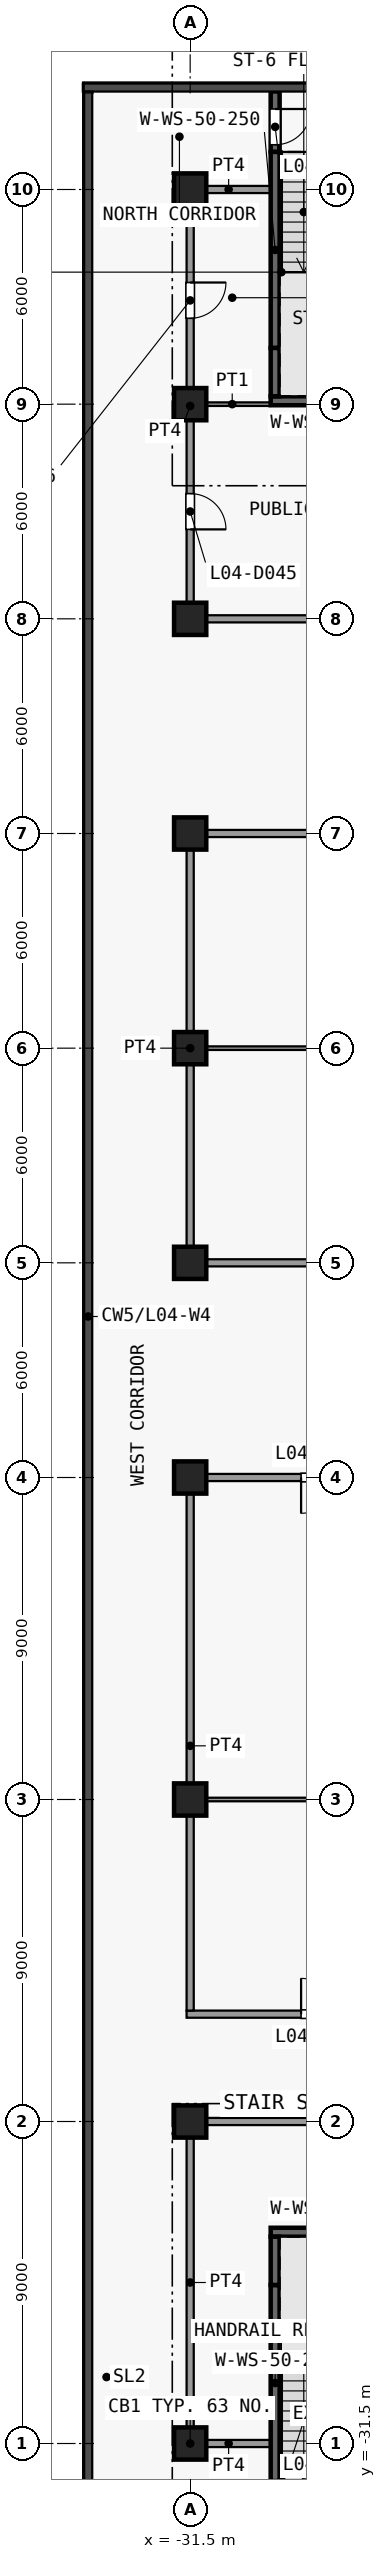
"""IFC4 building model, lengths in metres.
Left out: names, types, materials, properties, quantities, classifications, styles, units other than length and angle.
Written with IfcOpenShell. Run it as: python <this file> out.ifc"""

import sys

from ifc_helpers import new_model, si_unit, direction, frame, frame_2d, origin, origin_2d, place, context, subcontext, project, spatial, rectangle, extrude, element, fill, save


model = new_model("IFC4")
c1 = context("Model", 3, precision=1e-05, world=origin(), true_north=direction((0.0, 1.0)))
c2 = subcontext(c1, "Body", "Model", "MODEL_VIEW")
j1 = project(units=[si_unit("LENGTHUNIT", "METRE"), si_unit("PLANEANGLEUNIT", "RADIAN")], contexts=[c1])
p1 = place(None, origin())
s1 = spatial("IfcSite", under=j1, at=p1, CompositionType="ELEMENT")
p2 = place(p1, origin())
s2 = spatial("IfcBuilding", under=s1, at=p2, CompositionType="ELEMENT")
p3 = place(p2, frame((0.0, 0.0, 23.5)))
s3 = spatial("IfcBuildingStorey", under=s2, at=p3, CompositionType="ELEMENT", Elevation=23.5)
for number, where, z_axis, x_axis in (
    (1, (-31.5, -31.5, 0.0), (0.0, 0.0, 1.0), (1.0, 0.0, 0.0)),
    (2, (-31.5, -22.5, 0.0), (0.0, 0.0, 1.0), (1.0, 0.0, 0.0)),
    (3, (-31.5, -13.5, 0.0), (0.0, 0.0, 1.0), (1.0, 0.0, 0.0)),
    (4, (-31.5, -4.5, 0.0), (0.0, 0.0, 1.0), (1.0, 0.0, 0.0)),
    (5, (-31.5, 1.5, 0.0), (0.0, 0.0, 1.0), (1.0, 0.0, 0.0)),
    (6, (-31.5, 7.5, 0.0), (0.0, 0.0, 1.0), (1.0, 0.0, 0.0)),
    (7, (-31.5, 13.5, 0.0), (0.0, 0.0, 1.0), (1.0, 0.0, 0.0)),
    (8, (-31.5, 19.5, 0.0), (0.0, 0.0, 1.0), (1.0, 0.0, 0.0)),
    (9, (-31.5, 25.5, 0.0), (0.0, 0.0, 1.0), (1.0, 0.0, 0.0)),
    (10, (-31.5, 31.5, 0.0), (0.0, 0.0, 1.0), (1.0, 0.0, 0.0)),
):
    element("IfcColumn", number, at=place(p3, frame(where, z_axis=z_axis, x_axis=x_axis)), inside=s3, PredefinedType="COLUMN", context=c2, shape_type="SweptSolid", body=[
        extrude(rectangle(XDim=0.9, YDim=0.9, at=origin_2d()), origin(), (0.0, 0.0, 1.0), 4.5),
    ])
p4 = place(p3, frame((-29.125, -32.55, 0.0), z_axis=(0.0, 0.0, 1.0), x_axis=(0.0, 1.0, 0.0)))
e11 = element("IfcWall", 11, at=p4, inside=s3, PredefinedType="SHEAR", context=c2, shape_type="SweptSolid", body=[
    extrude(rectangle(XDim=5.48, YDim=0.25, at=frame_2d((2.74, 0.0))), origin(), (0.0, 0.0, 1.0), 4.15),
])
p5 = place(p3, frame((-29.125, -27.07, 0.0), z_axis=(0.0, 0.0, 1.0), x_axis=(0.0, 1.0, 0.0)))
e12 = element("IfcWall", 12, at=p5, inside=s3, PredefinedType="SHEAR", context=c2, shape_type="SweptSolid", body=[
    extrude(rectangle(XDim=1.35, YDim=0.25, at=frame_2d((0.675, 0.0))), origin(), (0.0, 0.0, 1.0), 4.15),
])
p6 = place(p3, frame((-29.25, -25.595, 0.0), z_axis=(0.0, 0.0, 1.0), x_axis=(1.0, 0.0, 0.0)))
e13 = element("IfcWall", 13, at=p6, inside=s3, PredefinedType="SHEAR", context=c2, shape_type="SweptSolid", body=[
    extrude(rectangle(XDim=3.35, YDim=0.25, at=frame_2d((1.675, 0.0))), origin(), (0.0, 0.0, 1.0), 4.15),
])
p7 = place(p3, frame((-29.125, 34.24, 0.0), z_axis=(0.0, 0.0, 1.0), x_axis=(0.0, -1.0, 0.0)))
e14 = element("IfcWall", 14, at=p7, inside=s3, PredefinedType="SHEAR", context=c2, shape_type="SweptSolid", body=[
    extrude(rectangle(XDim=1.69, YDim=0.25, at=frame_2d((0.845, 0.0))), origin(), (0.0, 0.0, 1.0), 4.15),
])
p8 = place(p7, frame((0.49, 0.0, 0.0)))
e15 = element("IfcOpeningElement", 15, at=p8, cuts=e14, PredefinedType="OPENING", context=c2, shape_type="SweptSolid", body=[
    extrude(rectangle(XDim=1.0, YDim=2.1, at=frame_2d((0.5, 1.05))), frame((0.0, 0.135, 0.0), z_axis=(0.0, -1.0, 0.0), x_axis=(1.0, 0.0, 0.0)), (0.0, 0.0, 1.0), 0.27),
])
p9 = place(p3, frame((-29.125, 27.07, 0.0), z_axis=(0.0, 0.0, 1.0), x_axis=(0.0, 1.0, 0.0)))
e16 = element("IfcWall", 16, at=p9, inside=s3, PredefinedType="SHEAR", context=c2, shape_type="SweptSolid", body=[
    extrude(rectangle(XDim=5.48, YDim=0.25, at=frame_2d((2.74, 0.0))), origin(), (0.0, 0.0, 1.0), 4.15),
])
p10 = place(p3, frame((-29.125, 25.72, 0.0), z_axis=(0.0, 0.0, 1.0), x_axis=(0.0, 1.0, 0.0)))
e17 = element("IfcWall", 17, at=p10, inside=s3, PredefinedType="SHEAR", context=c2, shape_type="SweptSolid", body=[
    extrude(rectangle(XDim=1.35, YDim=0.25, at=frame_2d((0.675, 0.0))), origin(), (0.0, 0.0, 1.0), 4.15),
])
p11 = place(p3, frame((-29.25, 25.595, 0.0), z_axis=(0.0, 0.0, 1.0), x_axis=(1.0, 0.0, 0.0)))
e18 = element("IfcWall", 18, at=p11, inside=s3, PredefinedType="SHEAR", context=c2, shape_type="SweptSolid", body=[
    extrude(rectangle(XDim=3.35, YDim=0.25, at=frame_2d((1.675, 0.0))), origin(), (0.0, 0.0, 1.0), 4.15),
])
p12 = place(p3, frame((-31.6, -31.5, 0.0), z_axis=(0.0, 0.0, 1.0), x_axis=(1.0, 0.0, 0.0)))
e19 = element("IfcWall", 19, at=p12, inside=s3, PredefinedType="PARTITIONING", context=c2, shape_type="SweptSolid", body=[
    extrude(rectangle(XDim=2.35, YDim=0.2, at=frame_2d((1.175, 0.0))), origin(), (0.0, 0.0, 1.0), 4.15),
])
p13 = place(p3, frame((-31.6, -22.5, 0.0), z_axis=(0.0, 0.0, 1.0), x_axis=(1.0, 0.0, 0.0)))
e20 = element("IfcWall", 20, at=p13, inside=s3, PredefinedType="PARTITIONING", context=c2, shape_type="SweptSolid", body=[
    extrude(rectangle(XDim=14.2, YDim=0.2, at=frame_2d((7.1, 0.0))), origin(), (0.0, 0.0, 1.0), 4.15),
])
p14 = place(p3, frame((-31.6, -19.5, 0.0), z_axis=(0.0, 0.0, 1.0), x_axis=(1.0, 0.0, 0.0)))
e21 = element("IfcWall", 21, at=p14, inside=s3, PredefinedType="PARTITIONING", context=c2, shape_type="SweptSolid", body=[
    extrude(rectangle(XDim=18.1, YDim=0.2, at=frame_2d((9.05, 0.0))), origin(), (0.0, 0.0, 1.0), 4.15),
])
p15 = place(p14, frame((3.2, 0.0, 0.0)))
e22 = element("IfcOpeningElement", 22, at=p15, cuts=e21, PredefinedType="OPENING", context=c2, shape_type="SweptSolid", body=[
    extrude(rectangle(XDim=1.0, YDim=2.1, at=frame_2d((0.5, 1.05))), frame((0.0, 0.11, 0.0), z_axis=(0.0, -1.0, 0.0), x_axis=(1.0, 0.0, 0.0)), (0.0, 0.0, 1.0), 0.22),
])
p16 = place(p14, frame((14.0, 0.0, 0.0)))
e23 = element("IfcOpeningElement", 23, at=p16, cuts=e21, PredefinedType="OPENING", context=c2, shape_type="SweptSolid", body=[
    extrude(rectangle(XDim=1.0, YDim=2.1, at=frame_2d((0.5, 1.05))), frame((0.0, 0.11, 0.0), z_axis=(0.0, -1.0, 0.0), x_axis=(1.0, 0.0, 0.0)), (0.0, 0.0, 1.0), 0.22),
])
p17 = place(p3, frame((-31.4, -13.5, 0.0), z_axis=(0.0, 0.0, 1.0), x_axis=(1.0, 0.0, 0.0)))
e24 = element("IfcWall", 24, at=p17, inside=s3, PredefinedType="PARTITIONING", context=c2, shape_type="SweptSolid", body=[
    extrude(rectangle(XDim=17.9, YDim=0.1, at=frame_2d((8.95, 0.0))), origin(), (0.0, 0.0, 1.0), 4.15),
])
p18 = place(p3, frame((-31.6, -4.5, 0.0), z_axis=(0.0, 0.0, 1.0), x_axis=(1.0, 0.0, 0.0)))
e25 = element("IfcWall", 25, at=p18, inside=s3, PredefinedType="PARTITIONING", context=c2, shape_type="SweptSolid", body=[
    extrude(rectangle(XDim=18.2, YDim=0.2, at=frame_2d((9.1, 0.0))), origin(), (0.0, 0.0, 1.0), 4.15),
])
p19 = place(p18, frame((3.2, 0.0, 0.0)))
e26 = element("IfcOpeningElement", 26, at=p19, cuts=e25, PredefinedType="OPENING", context=c2, shape_type="SweptSolid", body=[
    extrude(rectangle(XDim=1.0, YDim=2.1, at=frame_2d((0.5, 1.05))), frame((0.0, 0.11, 0.0), z_axis=(0.0, -1.0, 0.0), x_axis=(1.0, 0.0, 0.0)), (0.0, 0.0, 1.0), 0.22),
])
p20 = place(p18, frame((13.2, 0.0, 0.0)))
e27 = element("IfcOpeningElement", 27, at=p20, cuts=e25, PredefinedType="OPENING", context=c2, shape_type="SweptSolid", body=[
    extrude(rectangle(XDim=1.0, YDim=2.1, at=frame_2d((0.5, 1.05))), frame((0.0, 0.11, 0.0), z_axis=(0.0, -1.0, 0.0), x_axis=(1.0, 0.0, 0.0)), (0.0, 0.0, 1.0), 0.22),
])
p21 = place(p3, frame((-31.6, 1.5, 0.0), z_axis=(0.0, 0.0, 1.0), x_axis=(1.0, 0.0, 0.0)))
e28 = element("IfcWall", 28, at=p21, inside=s3, PredefinedType="PARTITIONING", context=c2, shape_type="SweptSolid", body=[
    extrude(rectangle(XDim=11.3, YDim=0.2, at=frame_2d((5.65, 0.0))), origin(), (0.0, 0.0, 1.0), 4.15),
])
p22 = place(p21, frame((5.1, 0.0, 0.0)))
e29 = element("IfcOpeningElement", 29, at=p22, cuts=e28, PredefinedType="OPENING", context=c2, shape_type="SweptSolid", body=[
    extrude(rectangle(XDim=1.0, YDim=2.1, at=frame_2d((0.5, 1.05))), frame((0.0, 0.11, 0.0), z_axis=(0.0, -1.0, 0.0), x_axis=(1.0, 0.0, 0.0)), (0.0, 0.0, 1.0), 0.22),
])
p23 = place(p3, frame((-31.4, 7.5, 0.0), z_axis=(0.0, 0.0, 1.0), x_axis=(1.0, 0.0, 0.0)))
e30 = element("IfcWall", 30, at=p23, inside=s3, PredefinedType="PARTITIONING", context=c2, shape_type="SweptSolid", body=[
    extrude(rectangle(XDim=10.9, YDim=0.1, at=frame_2d((5.45, 0.0))), origin(), (0.0, 0.0, 1.0), 4.15),
])
p24 = place(p3, frame((-31.6, 13.5, 0.0), z_axis=(0.0, 0.0, 1.0), x_axis=(1.0, 0.0, 0.0)))
e31 = element("IfcWall", 31, at=p24, inside=s3, PredefinedType="PARTITIONING", context=c2, shape_type="SweptSolid", body=[
    extrude(rectangle(XDim=11.3, YDim=0.2, at=frame_2d((5.65, 0.0))), origin(), (0.0, 0.0, 1.0), 4.15),
])
p25 = place(p24, frame((5.1, 0.0, 0.0)))
e32 = element("IfcOpeningElement", 32, at=p25, cuts=e31, PredefinedType="OPENING", context=c2, shape_type="SweptSolid", body=[
    extrude(rectangle(XDim=1.0, YDim=2.1, at=frame_2d((0.5, 1.05))), frame((0.0, 0.11, 0.0), z_axis=(0.0, -1.0, 0.0), x_axis=(1.0, 0.0, 0.0)), (0.0, 0.0, 1.0), 0.22),
])
p26 = place(p3, frame((-31.6, 19.5, 0.0), z_axis=(0.0, 0.0, 1.0), x_axis=(1.0, 0.0, 0.0)))
e33 = element("IfcWall", 33, at=p26, inside=s3, PredefinedType="PARTITIONING", context=c2, shape_type="SweptSolid", body=[
    extrude(rectangle(XDim=60.1, YDim=0.2, at=frame_2d((30.05, 0.0))), origin(), (0.0, 0.0, 1.0), 4.15),
])
p27 = place(p26, frame((7.2, 0.0, 0.0)))
e34 = element("IfcOpeningElement", 34, at=p27, cuts=e33, PredefinedType="OPENING", context=c2, shape_type="SweptSolid", body=[
    extrude(rectangle(XDim=1.0, YDim=2.1, at=frame_2d((0.5, 1.05))), frame((0.0, 0.11, 0.0), z_axis=(0.0, -1.0, 0.0), x_axis=(1.0, 0.0, 0.0)), (0.0, 0.0, 1.0), 0.22),
])
p28 = place(p26, frame((13.2, 0.0, 0.0)))
e35 = element("IfcOpeningElement", 35, at=p28, cuts=e33, PredefinedType="OPENING", context=c2, shape_type="SweptSolid", body=[
    extrude(rectangle(XDim=1.0, YDim=2.1, at=frame_2d((0.5, 1.05))), frame((0.0, 0.11, 0.0), z_axis=(0.0, -1.0, 0.0), x_axis=(1.0, 0.0, 0.0)), (0.0, 0.0, 1.0), 0.22),
])
p29 = place(p26, frame((25.2, 0.0, 0.0)))
e36 = element("IfcOpeningElement", 36, at=p29, cuts=e33, PredefinedType="OPENING", context=c2, shape_type="SweptSolid", body=[
    extrude(rectangle(XDim=1.0, YDim=2.1, at=frame_2d((0.5, 1.05))), frame((0.0, 0.11, 0.0), z_axis=(0.0, -1.0, 0.0), x_axis=(1.0, 0.0, 0.0)), (0.0, 0.0, 1.0), 0.22),
])
p30 = place(p26, frame((33.5, 0.0, 0.0)))
e37 = element("IfcOpeningElement", 37, at=p30, cuts=e33, PredefinedType="OPENING", context=c2, shape_type="SweptSolid", body=[
    extrude(rectangle(XDim=1.8, YDim=2.1, at=frame_2d((0.9, 1.05))), frame((0.0, 0.11, 0.0), z_axis=(0.0, -1.0, 0.0), x_axis=(1.0, 0.0, 0.0)), (0.0, 0.0, 1.0), 0.22),
])
p31 = place(p26, frame((49.0, 0.0, 0.0)))
e38 = element("IfcOpeningElement", 38, at=p31, cuts=e33, PredefinedType="OPENING", context=c2, shape_type="SweptSolid", body=[
    extrude(rectangle(XDim=1.8, YDim=2.1, at=frame_2d((0.9, 1.05))), frame((0.0, 0.11, 0.0), z_axis=(0.0, -1.0, 0.0), x_axis=(1.0, 0.0, 0.0)), (0.0, 0.0, 1.0), 0.22),
])
p32 = place(p26, frame((55.0, 0.0, 0.0)))
e39 = element("IfcOpeningElement", 39, at=p32, cuts=e33, PredefinedType="OPENING", context=c2, shape_type="SweptSolid", body=[
    extrude(rectangle(XDim=1.0, YDim=2.1, at=frame_2d((0.5, 1.05))), frame((0.0, 0.11, 0.0), z_axis=(0.0, -1.0, 0.0), x_axis=(1.0, 0.0, 0.0)), (0.0, 0.0, 1.0), 0.22),
])
p33 = place(p26, frame((58.3, 0.0, 0.0)))
e40 = element("IfcOpeningElement", 40, at=p33, cuts=e33, PredefinedType="OPENING", context=c2, shape_type="SweptSolid", body=[
    extrude(rectangle(XDim=1.0, YDim=2.1, at=frame_2d((0.5, 1.05))), frame((0.0, 0.11, 0.0), z_axis=(0.0, -1.0, 0.0), x_axis=(1.0, 0.0, 0.0)), (0.0, 0.0, 1.0), 0.22),
])
p34 = place(p3, frame((-31.4, 25.5, 0.0), z_axis=(0.0, 0.0, 1.0), x_axis=(1.0, 0.0, 0.0)))
e41 = element("IfcWall", 41, at=p34, inside=s3, PredefinedType="PARTITIONING", context=c2, shape_type="SweptSolid", body=[
    extrude(rectangle(XDim=2.15, YDim=0.1, at=frame_2d((1.075, 0.0))), origin(), (0.0, 0.0, 1.0), 4.15),
])
p35 = place(p3, frame((-31.6, 31.5, 0.0), z_axis=(0.0, 0.0, 1.0), x_axis=(1.0, 0.0, 0.0)))
e42 = element("IfcWall", 42, at=p35, inside=s3, PredefinedType="PARTITIONING", context=c2, shape_type="SweptSolid", body=[
    extrude(rectangle(XDim=2.35, YDim=0.2, at=frame_2d((1.175, 0.0))), origin(), (0.0, 0.0, 1.0), 4.15),
])
p36 = place(p3, frame((-31.5, -31.4, 0.0), z_axis=(0.0, 0.0, 1.0), x_axis=(0.0, 1.0, 0.0)))
e43 = element("IfcWall", 43, at=p36, inside=s3, PredefinedType="PARTITIONING", context=c2, shape_type="SweptSolid", body=[
    extrude(rectangle(XDim=8.8, YDim=0.2, at=frame_2d((4.4, 0.0))), origin(), (0.0, 0.0, 1.0), 4.15),
])
p37 = place(p3, frame((-31.5, -19.4, 0.0), z_axis=(0.0, 0.0, 1.0), x_axis=(0.0, 1.0, 0.0)))
e44 = element("IfcWall", 44, at=p37, inside=s3, PredefinedType="PARTITIONING", context=c2, shape_type="SweptSolid", body=[
    extrude(rectangle(XDim=14.8, YDim=0.2, at=frame_2d((7.4, 0.0))), origin(), (0.0, 0.0, 1.0), 4.15),
])
p38 = place(p3, frame((-31.5, 1.6, 0.0), z_axis=(0.0, 0.0, 1.0), x_axis=(0.0, 1.0, 0.0)))
e45 = element("IfcWall", 45, at=p38, inside=s3, PredefinedType="PARTITIONING", context=c2, shape_type="SweptSolid", body=[
    extrude(rectangle(XDim=11.8, YDim=0.2, at=frame_2d((5.9, 0.0))), origin(), (0.0, 0.0, 1.0), 4.15),
])
p39 = place(p3, frame((-31.5, 19.6, 0.0), z_axis=(0.0, 0.0, 1.0), x_axis=(0.0, 1.0, 0.0)))
e46 = element("IfcWall", 46, at=p39, inside=s3, PredefinedType="PARTITIONING", context=c2, shape_type="SweptSolid", body=[
    extrude(rectangle(XDim=11.8, YDim=0.2, at=frame_2d((5.9, 0.0))), origin(), (0.0, 0.0, 1.0), 4.15),
])
p40 = place(p39, frame((2.4, 0.0, 0.0)))
e47 = element("IfcOpeningElement", 47, at=p40, cuts=e46, PredefinedType="OPENING", context=c2, shape_type="SweptSolid", body=[
    extrude(rectangle(XDim=1.0, YDim=2.1, at=frame_2d((0.5, 1.05))), frame((0.0, 0.11, 0.0), z_axis=(0.0, -1.0, 0.0), x_axis=(1.0, 0.0, 0.0)), (0.0, 0.0, 1.0), 0.22),
])
p41 = place(p39, frame((8.3, 0.0, 0.0)))
e48 = element("IfcOpeningElement", 48, at=p41, cuts=e46, PredefinedType="OPENING", context=c2, shape_type="SweptSolid", body=[
    extrude(rectangle(XDim=1.0, YDim=2.1, at=frame_2d((0.5, 1.05))), frame((0.0, 0.11, 0.0), z_axis=(0.0, -1.0, 0.0), x_axis=(1.0, 0.0, 0.0)), (0.0, 0.0, 1.0), 0.22),
])
p42 = place(p8, origin())
e49 = element("IfcDoor", 49, at=p42, inside=s3, OperationType="SINGLE_SWING_LEFT", PredefinedType="DOOR", context=c2, shape_type="SweptSolid", body=[
    extrude(rectangle(XDim=1.0, YDim=2.1, at=frame_2d((0.5, 1.05))), frame((0.0, 0.025, 0.0), z_axis=(0.0, -1.0, 0.0), x_axis=(1.0, 0.0, 0.0)), (0.0, 0.0, 1.0), 0.05),
])
fill(e15, e49)
p43 = place(p15, origin())
e50 = element("IfcDoor", 50, at=p43, inside=s3, OperationType="SINGLE_SWING_RIGHT", PredefinedType="DOOR", context=c2, shape_type="SweptSolid", body=[
    extrude(rectangle(XDim=1.0, YDim=2.1, at=frame_2d((0.5, 1.05))), frame((0.0, 0.025, 0.0), z_axis=(0.0, -1.0, 0.0), x_axis=(1.0, 0.0, 0.0)), (0.0, 0.0, 1.0), 0.05),
])
fill(e22, e50)
p44 = place(p19, origin())
e51 = element("IfcDoor", 51, at=p44, inside=s3, OperationType="SINGLE_SWING_LEFT", PredefinedType="DOOR", context=c2, shape_type="SweptSolid", body=[
    extrude(rectangle(XDim=1.0, YDim=2.1, at=frame_2d((0.5, 1.05))), frame((0.0, 0.025, 0.0), z_axis=(0.0, -1.0, 0.0), x_axis=(1.0, 0.0, 0.0)), (0.0, 0.0, 1.0), 0.05),
])
fill(e26, e51)
p45 = place(p40, origin())
e52 = element("IfcDoor", 52, at=p45, inside=s3, OperationType="SINGLE_SWING_LEFT", PredefinedType="DOOR", context=c2, shape_type="SweptSolid", body=[
    extrude(rectangle(XDim=1.0, YDim=2.1, at=frame_2d((0.5, 1.05))), frame((0.0, 0.025, 0.0), z_axis=(0.0, -1.0, 0.0), x_axis=(1.0, 0.0, 0.0)), (0.0, 0.0, 1.0), 0.05),
])
fill(e47, e52)
p46 = place(p41, origin())
e53 = element("IfcDoor", 53, at=p46, inside=s3, OperationType="SINGLE_SWING_RIGHT", PredefinedType="DOOR", context=c2, shape_type="SweptSolid", body=[
    extrude(rectangle(XDim=1.0, YDim=2.1, at=frame_2d((0.5, 1.05))), frame((0.0, 0.025, 0.0), z_axis=(0.0, -1.0, 0.0), x_axis=(1.0, 0.0, 0.0)), (0.0, 0.0, 1.0), 0.05),
])
fill(e48, e53)
save(model, sys.argv[1])
